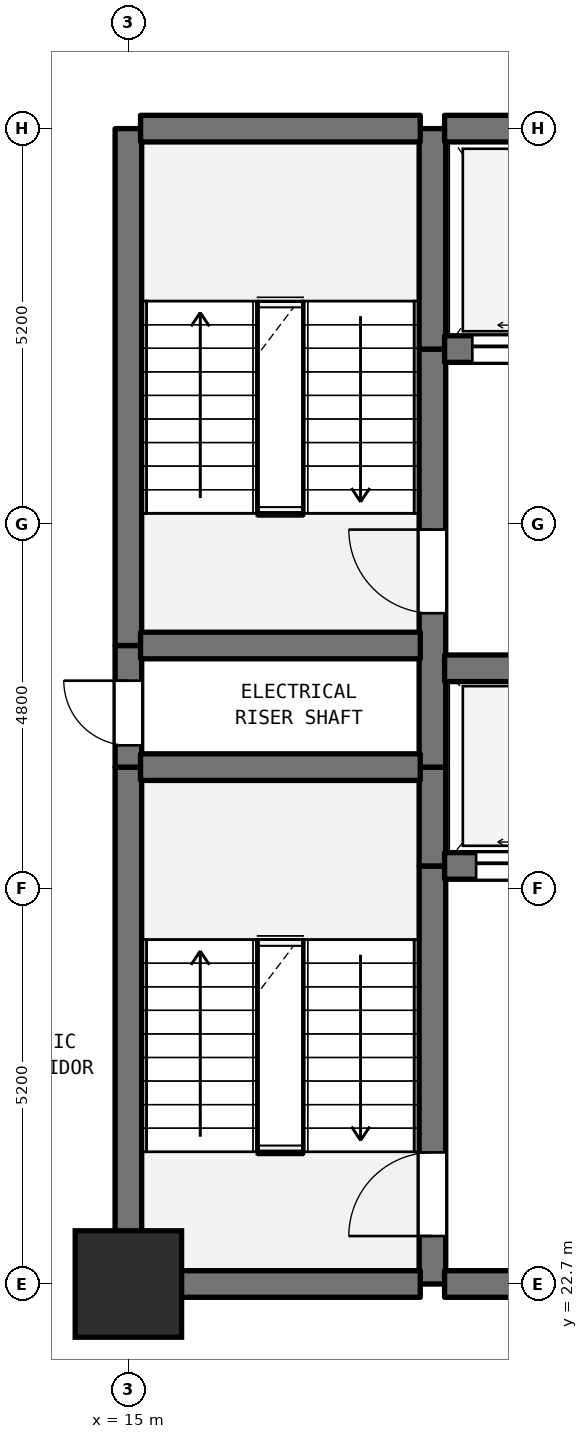
"""IFC4 building model, lengths in metres.
Left out: names, types, materials, properties, quantities, classifications, styles, units other than length and angle.
Written with IfcOpenShell. Run it as: python <this file> out.ifc"""

import sys

from ifc_helpers import new_model, si_unit, direction, frame, frame_2d, origin, origin_2d, place, context, subcontext, project, spatial, rectangle, extrude, element, fill, save


model = new_model("IFC4")
c1 = context("Model", 3, precision=1e-05, world=origin(), true_north=direction((0.0, 1.0)))
c2 = subcontext(c1, "Body", "Model", "MODEL_VIEW")
j1 = project(units=[si_unit("LENGTHUNIT", "METRE"), si_unit("PLANEANGLEUNIT", "RADIAN")], contexts=[c1])
p1 = place(None, origin())
s1 = spatial("IfcSite", under=j1, at=p1, CompositionType="ELEMENT")
p2 = place(p1, origin())
s2 = spatial("IfcBuilding", under=s1, at=p2, CompositionType="ELEMENT")
p3 = place(p2, frame((0.0, 0.0, 6.5)))
s3 = spatial("IfcBuildingStorey", under=s2, at=p3, CompositionType="ELEMENT", Elevation=6.5)
p4 = place(p3, frame((15.0, 22.7, 0.0), z_axis=(0.0, 0.0, 1.0), x_axis=(1.0, 0.0, 0.0)))
e1 = element("IfcColumn", 1, at=p4, inside=s3, PredefinedType="COLUMN", context=c2, shape_type="SweptSolid", body=[
    extrude(rectangle(XDim=1.4, YDim=1.4, at=origin_2d()), origin(), (0.0, 0.0, 1.0), 6.5),
])
p5 = place(p3, frame((15.0, 22.7, 0.0), z_axis=(0.0, 0.0, 1.0), x_axis=(0.0, 1.0, 0.0)))
e2 = element("IfcWall", 2, at=p5, inside=s3, PredefinedType="SHEAR", context=c2, shape_type="SweptSolid", body=[
    extrude(rectangle(XDim=6.8, YDim=0.35, at=frame_2d((3.4, 0.0))), origin(), (0.0, 0.0, 1.0), 6.17),
])
p6 = place(p3, frame((15.0, 29.5, 0.0), z_axis=(0.0, 0.0, 1.0), x_axis=(0.0, 1.0, 0.0)))
e3 = element("IfcWall", 3, at=p6, inside=s3, PredefinedType="SHEAR", context=c2, shape_type="SweptSolid", body=[
    extrude(rectangle(XDim=1.6, YDim=0.35, at=frame_2d((0.8, 0.0))), origin(), (0.0, 0.0, 1.0), 6.17),
])
p7 = place(p6, frame((0.287, 0.0, 0.0)))
e4 = element("IfcOpeningElement", 4, at=p7, cuts=e3, PredefinedType="OPENING", context=c2, shape_type="SweptSolid", body=[
    extrude(rectangle(XDim=0.85, YDim=2.1, at=frame_2d((0.425, 1.05))), frame((0.0, 0.185, 0.0), z_axis=(0.0, -1.0, 0.0), x_axis=(1.0, 0.0, 0.0)), (0.0, 0.0, 1.0), 0.37),
])
p8 = place(p3, frame((15.0, 31.1, 0.0), z_axis=(0.0, 0.0, 1.0), x_axis=(0.0, 1.0, 0.0)))
e5 = element("IfcWall", 5, at=p8, inside=s3, PredefinedType="SHEAR", context=c2, shape_type="SweptSolid", body=[
    extrude(rectangle(XDim=6.8, YDim=0.35, at=frame_2d((3.4, 0.0))), origin(), (0.0, 0.0, 1.0), 6.17),
])
p9 = place(p3, frame((19.0, 22.7, 0.0), z_axis=(0.0, 0.0, 1.0), x_axis=(0.0, 1.0, 0.0)))
e6 = element("IfcWall", 6, at=p9, inside=s3, PredefinedType="SHEAR", context=c2, shape_type="SweptSolid", body=[
    extrude(rectangle(XDim=5.5, YDim=0.35, at=frame_2d((2.75, 0.0))), origin(), (0.0, 0.0, 1.0), 6.17),
])
p10 = place(p9, frame((0.631, 0.0, 0.0)))
e7 = element("IfcOpeningElement", 7, at=p10, cuts=e6, PredefinedType="OPENING", context=c2, shape_type="SweptSolid", body=[
    extrude(rectangle(XDim=1.1, YDim=2.15, at=frame_2d((0.55, 1.075))), frame((0.0, 0.185, 0.0), z_axis=(0.0, -1.0, 0.0), x_axis=(1.0, 0.0, 0.0)), (0.0, 0.0, 1.0), 0.37),
])
p11 = place(p3, frame((19.0, 28.2, 0.0), z_axis=(0.0, 0.0, 1.0), x_axis=(0.0, 1.0, 0.0)))
e8 = element("IfcWall", 8, at=p11, inside=s3, PredefinedType="SHEAR", context=c2, shape_type="SweptSolid", body=[
    extrude(rectangle(XDim=1.3, YDim=0.35, at=frame_2d((0.65, 0.0))), origin(), (0.0, 0.0, 1.0), 6.17),
])
p12 = place(p3, frame((19.0, 29.5, 0.0), z_axis=(0.0, 0.0, 1.0), x_axis=(0.0, 1.0, 0.0)))
e9 = element("IfcWall", 9, at=p12, inside=s3, PredefinedType="SHEAR", context=c2, shape_type="SweptSolid", body=[
    extrude(rectangle(XDim=5.5, YDim=0.35, at=frame_2d((2.75, 0.0))), origin(), (0.0, 0.0, 1.0), 6.17),
])
p13 = place(p12, frame((2.025, 0.0, 0.0)))
e10 = element("IfcOpeningElement", 10, at=p13, cuts=e9, PredefinedType="OPENING", context=c2, shape_type="SweptSolid", body=[
    extrude(rectangle(XDim=1.1, YDim=2.15, at=frame_2d((0.55, 1.075))), frame((0.0, 0.185, 0.0), z_axis=(0.0, -1.0, 0.0), x_axis=(1.0, 0.0, 0.0)), (0.0, 0.0, 1.0), 0.37),
])
p14 = place(p3, frame((19.0, 35.0, 0.0), z_axis=(0.0, 0.0, 1.0), x_axis=(0.0, 1.0, 0.0)))
e11 = element("IfcWall", 11, at=p14, inside=s3, PredefinedType="SHEAR", context=c2, shape_type="SweptSolid", body=[
    extrude(rectangle(XDim=2.9, YDim=0.35, at=frame_2d((1.45, 0.0))), origin(), (0.0, 0.0, 1.0), 6.17),
])
p15 = place(p3, frame((15.16, 22.7, 0.0), z_axis=(0.0, 0.0, 1.0), x_axis=(1.0, 0.0, 0.0)))
e12 = element("IfcWall", 12, at=p15, inside=s3, PredefinedType="SHEAR", context=c2, shape_type="SweptSolid", body=[
    extrude(rectangle(XDim=3.68, YDim=0.35, at=frame_2d((1.84, 0.0))), origin(), (0.0, 0.0, 1.0), 6.17),
])
p16 = place(p3, frame((19.16, 22.7, 0.0), z_axis=(0.0, 0.0, 1.0), x_axis=(1.0, 0.0, 0.0)))
e13 = element("IfcWall", 13, at=p16, inside=s3, PredefinedType="SHEAR", context=c2, shape_type="SweptSolid", body=[
    extrude(rectangle(XDim=4.48, YDim=0.35, at=frame_2d((2.24, 0.0))), origin(), (0.0, 0.0, 1.0), 6.17),
])
p17 = place(p16, frame((1.64, 0.0, 0.0)))
e14 = element("IfcOpeningElement", 14, at=p17, cuts=e13, PredefinedType="OPENING", context=c2, shape_type="SweptSolid", body=[
    extrude(rectangle(XDim=1.2, YDim=2.2, at=frame_2d((0.6, 1.1))), frame((0.0, 0.185, 0.0), z_axis=(0.0, -1.0, 0.0), x_axis=(1.0, 0.0, 0.0)), (0.0, 0.0, 1.0), 0.37),
])
p18 = place(p3, frame((19.16, 28.2, 0.0), z_axis=(0.0, 0.0, 1.0), x_axis=(1.0, 0.0, 0.0)))
e15 = element("IfcWall", 15, at=p18, inside=s3, PredefinedType="SHEAR", context=c2, shape_type="SweptSolid", body=[
    extrude(rectangle(XDim=4.48, YDim=0.35, at=frame_2d((2.24, 0.0))), origin(), (0.0, 0.0, 1.0), 6.17),
])
p19 = place(p18, frame((0.415, 0.0, 0.0)))
e16 = element("IfcOpeningElement", 16, at=p19, cuts=e15, PredefinedType="OPENING", context=c2, shape_type="SweptSolid", body=[
    extrude(rectangle(XDim=1.25, YDim=2.2, at=frame_2d((0.625, 1.1))), frame((0.0, 0.185, 0.0), z_axis=(0.0, -1.0, 0.0), x_axis=(1.0, 0.0, 0.0)), (0.0, 0.0, 1.0), 0.37),
])
p20 = place(p18, frame((2.815, 0.0, 0.0)))
e17 = element("IfcOpeningElement", 17, at=p20, cuts=e15, PredefinedType="OPENING", context=c2, shape_type="SweptSolid", body=[
    extrude(rectangle(XDim=1.25, YDim=2.2, at=frame_2d((0.625, 1.1))), frame((0.0, 0.185, 0.0), z_axis=(0.0, -1.0, 0.0), x_axis=(1.0, 0.0, 0.0)), (0.0, 0.0, 1.0), 0.37),
])
p21 = place(p3, frame((15.16, 29.5, 0.0), z_axis=(0.0, 0.0, 1.0), x_axis=(1.0, 0.0, 0.0)))
e18 = element("IfcWall", 18, at=p21, inside=s3, PredefinedType="SHEAR", context=c2, shape_type="SweptSolid", body=[
    extrude(rectangle(XDim=3.68, YDim=0.35, at=frame_2d((1.84, 0.0))), origin(), (0.0, 0.0, 1.0), 6.17),
])
p22 = place(p3, frame((19.16, 30.8, 0.0), z_axis=(0.0, 0.0, 1.0), x_axis=(1.0, 0.0, 0.0)))
e19 = element("IfcWall", 19, at=p22, inside=s3, PredefinedType="SHEAR", context=c2, shape_type="SweptSolid", body=[
    extrude(rectangle(XDim=4.48, YDim=0.35, at=frame_2d((2.24, 0.0))), origin(), (0.0, 0.0, 1.0), 6.17),
])
p23 = place(p3, frame((15.16, 31.1, 0.0), z_axis=(0.0, 0.0, 1.0), x_axis=(1.0, 0.0, 0.0)))
e20 = element("IfcWall", 20, at=p23, inside=s3, PredefinedType="SHEAR", context=c2, shape_type="SweptSolid", body=[
    extrude(rectangle(XDim=3.68, YDim=0.35, at=frame_2d((1.84, 0.0))), origin(), (0.0, 0.0, 1.0), 6.17),
])
p24 = place(p3, frame((19.16, 35.0, 0.0), z_axis=(0.0, 0.0, 1.0), x_axis=(1.0, 0.0, 0.0)))
e21 = element("IfcWall", 21, at=p24, inside=s3, PredefinedType="SHEAR", context=c2, shape_type="SweptSolid", body=[
    extrude(rectangle(XDim=11.48, YDim=0.35, at=frame_2d((5.74, 0.0))), origin(), (0.0, 0.0, 1.0), 6.17),
])
p25 = place(p24, frame((0.365, 0.0, 0.0)))
e22 = element("IfcOpeningElement", 22, at=p25, cuts=e21, PredefinedType="OPENING", context=c2, shape_type="SweptSolid", body=[
    extrude(rectangle(XDim=1.35, YDim=2.2, at=frame_2d((0.675, 1.1))), frame((0.0, 0.185, 0.0), z_axis=(0.0, -1.0, 0.0), x_axis=(1.0, 0.0, 0.0)), (0.0, 0.0, 1.0), 0.37),
])
p26 = place(p24, frame((2.765, 0.0, 0.0)))
e23 = element("IfcOpeningElement", 23, at=p26, cuts=e21, PredefinedType="OPENING", context=c2, shape_type="SweptSolid", body=[
    extrude(rectangle(XDim=1.35, YDim=2.2, at=frame_2d((0.675, 1.1))), frame((0.0, 0.185, 0.0), z_axis=(0.0, -1.0, 0.0), x_axis=(1.0, 0.0, 0.0)), (0.0, 0.0, 1.0), 0.37),
])
p27 = place(p24, frame((4.915, 0.0, 0.0)))
e24 = element("IfcOpeningElement", 24, at=p27, cuts=e21, PredefinedType="OPENING", context=c2, shape_type="SweptSolid", body=[
    extrude(rectangle(XDim=1.2, YDim=2.2, at=frame_2d((0.6, 1.1))), frame((0.0, 0.185, 0.0), z_axis=(0.0, -1.0, 0.0), x_axis=(1.0, 0.0, 0.0)), (0.0, 0.0, 1.0), 0.37),
])
p28 = place(p24, frame((6.665, 0.0, 0.0)))
e25 = element("IfcOpeningElement", 25, at=p28, cuts=e21, PredefinedType="OPENING", context=c2, shape_type="SweptSolid", body=[
    extrude(rectangle(XDim=1.2, YDim=2.2, at=frame_2d((0.6, 1.1))), frame((0.0, 0.185, 0.0), z_axis=(0.0, -1.0, 0.0), x_axis=(1.0, 0.0, 0.0)), (0.0, 0.0, 1.0), 0.37),
])
p29 = place(p24, frame((8.415, 0.0, 0.0)))
e26 = element("IfcOpeningElement", 26, at=p29, cuts=e21, PredefinedType="OPENING", context=c2, shape_type="SweptSolid", body=[
    extrude(rectangle(XDim=1.2, YDim=2.2, at=frame_2d((0.6, 1.1))), frame((0.0, 0.185, 0.0), z_axis=(0.0, -1.0, 0.0), x_axis=(1.0, 0.0, 0.0)), (0.0, 0.0, 1.0), 0.37),
])
p30 = place(p24, frame((10.16, 0.0, 0.0)))
e27 = element("IfcOpeningElement", 27, at=p30, cuts=e21, PredefinedType="OPENING", context=c2, shape_type="SweptSolid", body=[
    extrude(rectangle(XDim=1.2, YDim=2.2, at=frame_2d((0.6, 1.1))), frame((0.0, 0.185, 0.0), z_axis=(0.0, -1.0, 0.0), x_axis=(1.0, 0.0, 0.0)), (0.0, 0.0, 1.0), 0.37),
])
p31 = place(p3, frame((15.16, 37.9, 0.0), z_axis=(0.0, 0.0, 1.0), x_axis=(1.0, 0.0, 0.0)))
e28 = element("IfcWall", 28, at=p31, inside=s3, PredefinedType="SHEAR", context=c2, shape_type="SweptSolid", body=[
    extrude(rectangle(XDim=3.68, YDim=0.35, at=frame_2d((1.84, 0.0))), origin(), (0.0, 0.0, 1.0), 6.17),
])
p32 = place(p3, frame((19.16, 37.9, 0.0), z_axis=(0.0, 0.0, 1.0), x_axis=(1.0, 0.0, 0.0)))
e29 = element("IfcWall", 29, at=p32, inside=s3, PredefinedType="SHEAR", context=c2, shape_type="SweptSolid", body=[
    extrude(rectangle(XDim=11.48, YDim=0.35, at=frame_2d((5.74, 0.0))), origin(), (0.0, 0.0, 1.0), 6.17),
])
p33 = place(p7, origin())
e30 = element("IfcDoor", 30, at=p33, inside=s3, OperationType="SINGLE_SWING_RIGHT", PredefinedType="DOOR", context=c2, shape_type="SweptSolid", body=[
    extrude(rectangle(XDim=0.85, YDim=2.1, at=frame_2d((0.425, 1.05))), frame((0.0, 0.025, 0.0), z_axis=(0.0, -1.0, 0.0), x_axis=(1.0, 0.0, 0.0)), (0.0, 0.0, 1.0), 0.05),
])
fill(e4, e30)
p34 = place(p10, origin())
e31 = element("IfcDoor", 31, at=p34, inside=s3, OperationType="SINGLE_SWING_LEFT", PredefinedType="DOOR", context=c2, shape_type="SweptSolid", body=[
    extrude(rectangle(XDim=1.1, YDim=2.15, at=frame_2d((0.55, 1.075))), frame((0.0, 0.025, 0.0), z_axis=(0.0, -1.0, 0.0), x_axis=(1.0, 0.0, 0.0)), (0.0, 0.0, 1.0), 0.05),
])
fill(e7, e31)
p35 = place(p13, origin())
e32 = element("IfcDoor", 32, at=p35, inside=s3, OperationType="SINGLE_SWING_RIGHT", PredefinedType="DOOR", context=c2, shape_type="SweptSolid", body=[
    extrude(rectangle(XDim=1.1, YDim=2.15, at=frame_2d((0.55, 1.075))), frame((0.0, 0.025, 0.0), z_axis=(0.0, -1.0, 0.0), x_axis=(1.0, 0.0, 0.0)), (0.0, 0.0, 1.0), 0.05),
])
fill(e10, e32)
p36 = place(p19, origin())
e33 = element("IfcDoor", 33, at=p36, inside=s3, OperationType="DOUBLE_DOOR_SLIDING", PredefinedType="DOOR", context=c2, shape_type="SweptSolid", body=[
    extrude(rectangle(XDim=1.25, YDim=2.2, at=frame_2d((0.625, 1.1))), frame((0.0, 0.025, 0.0), z_axis=(0.0, -1.0, 0.0), x_axis=(1.0, 0.0, 0.0)), (0.0, 0.0, 1.0), 0.05),
])
fill(e16, e33)
p37 = place(p25, origin())
e34 = element("IfcDoor", 34, at=p37, inside=s3, OperationType="DOUBLE_DOOR_SLIDING", PredefinedType="DOOR", context=c2, shape_type="SweptSolid", body=[
    extrude(rectangle(XDim=1.35, YDim=2.2, at=frame_2d((0.675, 1.1))), frame((0.0, 0.025, 0.0), z_axis=(0.0, -1.0, 0.0), x_axis=(1.0, 0.0, 0.0)), (0.0, 0.0, 1.0), 0.05),
])
fill(e22, e34)
save(model, sys.argv[1])
